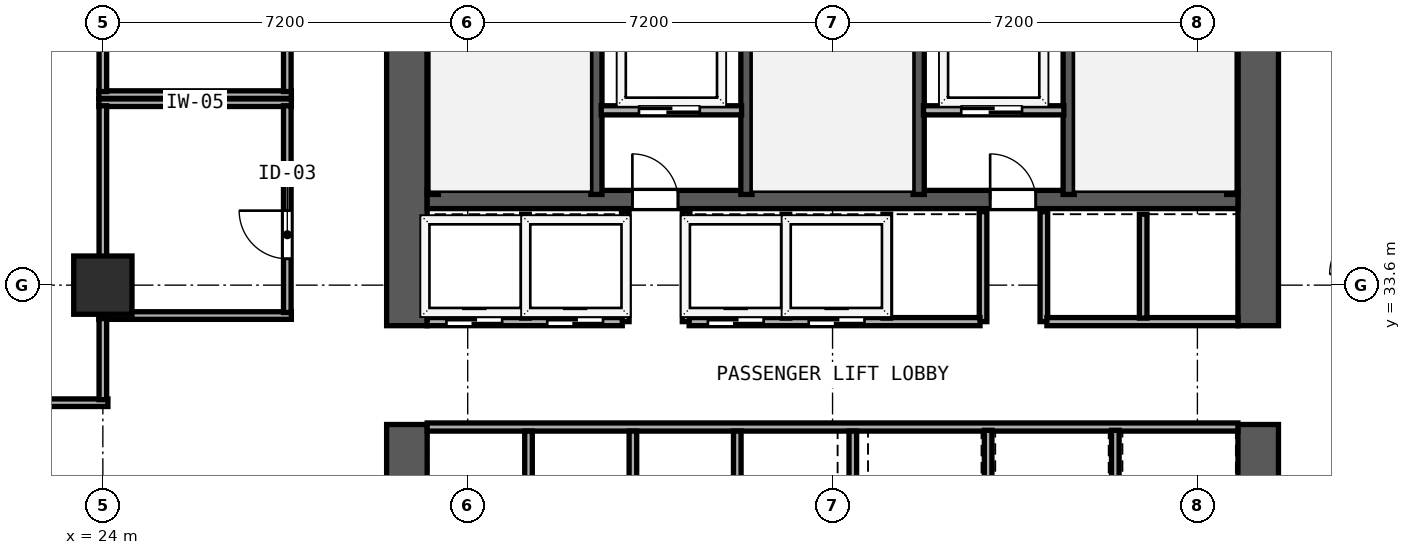
"""IFC4 building model, lengths in metres.
Left out: names, types, materials, properties, quantities, classifications, styles, units other than length and angle.
Written with IfcOpenShell. Run it as: python <this file> out.ifc"""

import sys

from ifc_helpers import new_model, si_unit, direction, frame, frame_2d, origin, origin_2d, place, context, subcontext, project, spatial, rectangle, hollow_rectangle, extrude, element, fill, save


model = new_model("IFC4")
c1 = context("Model", 3, precision=1e-05, world=origin(), true_north=direction((0.0, 1.0)))
c2 = subcontext(c1, "Body", "Model", "MODEL_VIEW")
j1 = project(units=[si_unit("LENGTHUNIT", "METRE"), si_unit("PLANEANGLEUNIT", "RADIAN")], contexts=[c1])
p1 = place(None, origin())
s1 = spatial("IfcSite", under=j1, at=p1, CompositionType="ELEMENT")
p2 = place(p1, origin())
s2 = spatial("IfcBuilding", under=s1, at=p2, CompositionType="ELEMENT")
p3 = place(p2, frame((0.0, 0.0, 55.2)))
s3 = spatial("IfcBuildingStorey", under=s2, at=p3, CompositionType="ELEMENT", Elevation=55.2)
p4 = place(p3, frame((30.0, 26.8, 0.0), z_axis=(0.0, 0.0, 1.0), x_axis=(0.0, 1.0, 0.0)))
e1 = element("IfcWall", 1, at=p4, inside=s3, PredefinedType="SHEAR", context=c2, shape_type="SweptSolid", body=[
    extrude(rectangle(XDim=4.05, YDim=0.8, at=frame_2d((2.025, 0.0))), origin(), (0.0, 0.0, 1.0), 3.6),
])
p5 = place(p3, frame((30.0, 32.8, 0.0), z_axis=(0.0, 0.0, 1.0), x_axis=(0.0, 1.0, 0.0)))
e2 = element("IfcWall", 2, at=p5, inside=s3, PredefinedType="SHEAR", context=c2, shape_type="SweptSolid", body=[
    extrude(rectangle(XDim=10.0, YDim=0.8, at=frame_2d((5.0, 0.0))), origin(), (0.0, 0.0, 1.0), 3.6),
])
p6 = place(p3, frame((46.8, 26.8, 0.0), z_axis=(0.0, 0.0, 1.0), x_axis=(0.0, 1.0, 0.0)))
e3 = element("IfcWall", 3, at=p6, inside=s3, PredefinedType="SHEAR", context=c2, shape_type="SweptSolid", body=[
    extrude(rectangle(XDim=4.05, YDim=0.8, at=frame_2d((2.025, 0.0))), origin(), (0.0, 0.0, 1.0), 3.6),
])
p7 = place(p3, frame((46.8, 32.8, 0.0), z_axis=(0.0, 0.0, 1.0), x_axis=(0.0, 1.0, 0.0)))
e4 = element("IfcWall", 4, at=p7, inside=s3, PredefinedType="SHEAR", context=c2, shape_type="SweptSolid", body=[
    extrude(rectangle(XDim=10.0, YDim=0.8, at=frame_2d((5.0, 0.0))), origin(), (0.0, 0.0, 1.0), 3.6),
])
p8 = place(p3, frame((30.4, 35.29, 0.0), z_axis=(0.0, 0.0, 1.0), x_axis=(1.0, 0.0, 0.0)))
e5 = element("IfcWall", 5, at=p8, inside=s3, PredefinedType="SHEAR", context=c2, shape_type="SweptSolid", body=[
    extrude(rectangle(XDim=16.0, YDim=0.36, at=frame_2d((8.0, 0.0))), origin(), (0.0, 0.0, 1.0), 3.6),
])
p9 = place(p8, frame((4.95, 0.0, 0.0), z_axis=(0.0, 0.0, 1.0), x_axis=(-1.0, 0.0, 0.0)))
e6 = element("IfcOpeningElement", 6, at=p9, cuts=e5, PredefinedType="OPENING", context=c2, shape_type="SweptSolid", body=[
    extrude(rectangle(XDim=0.9, YDim=2.1, at=frame_2d((0.45, 1.05))), frame((0.0, 0.19, 0.0), z_axis=(0.0, -1.0, 0.0), x_axis=(1.0, 0.0, 0.0)), (0.0, 0.0, 1.0), 0.38),
])
p10 = place(p8, frame((12.01, 0.0, 0.0), z_axis=(0.0, 0.0, 1.0), x_axis=(-1.0, 0.0, 0.0)))
e7 = element("IfcOpeningElement", 7, at=p10, cuts=e5, PredefinedType="OPENING", context=c2, shape_type="SweptSolid", body=[
    extrude(rectangle(XDim=0.9, YDim=2.1, at=frame_2d((0.45, 1.05))), frame((0.0, 0.19, 0.0), z_axis=(0.0, -1.0, 0.0), x_axis=(1.0, 0.0, 0.0)), (0.0, 0.0, 1.0), 0.38),
])
for number, where, z_axis, x_axis in (
    (8, (30.512, 35.39, 0.0), (0.0, 0.0, 1.0), (0.0, 1.0, 0.0)),
    (9, (33.74, 35.39, 0.0), (0.0, 0.0, 1.0), (0.0, 1.0, 0.0)),
    (10, (36.7, 35.39, 0.0), (0.0, 0.0, 1.0), (0.0, 1.0, 0.0)),
    (11, (40.1, 35.39, 0.0), (0.0, 0.0, 1.0), (0.0, 1.0, 0.0)),
    (12, (43.06, 35.39, 0.0), (0.0, 0.0, 1.0), (0.0, 1.0, 0.0)),
    (13, (46.288, 35.39, 0.0), (0.0, 0.0, 1.0), (0.0, 1.0, 0.0)),
):
    element("IfcWall", number, at=place(p3, frame(where, z_axis=z_axis, x_axis=x_axis)), inside=s3, PredefinedType="SHEAR", context=c2, shape_type="SweptSolid", body=[
        extrude(rectangle(XDim=7.41, YDim=0.22, at=frame_2d((3.705, 0.0))), origin(), (0.0, 0.0, 1.0), 3.6),
    ])
p11 = place(p3, frame((24.0, 33.6, 0.0), z_axis=(0.0, 0.0, 1.0), x_axis=(1.0, 0.0, 0.0)))
e14 = element("IfcColumn", 14, at=p11, inside=s3, PredefinedType="COLUMN", context=c2, shape_type="SweptSolid", body=[
    extrude(hollow_rectangle(XDim=1.15, YDim=1.15, WallThickness=0.042, at=origin_2d()), origin(), (0.0, 0.0, 1.0), 3.8),
])
p12 = place(p3, frame((33.835, 37.05, 0.0), z_axis=(0.0, 0.0, 1.0), x_axis=(1.0, 0.0, 0.0)))
e15 = element("IfcWall", 15, at=p12, inside=s3, PredefinedType="SOLIDWALL", context=c2, shape_type="SweptSolid", body=[
    extrude(rectangle(XDim=2.77, YDim=0.18, at=frame_2d((1.385, 0.0))), origin(), (0.0, 0.0, 1.0), 3.6),
])
p13 = place(p12, frame((1.945, 0.0, 0.0), z_axis=(0.0, 0.0, 1.0), x_axis=(-1.0, 0.0, 0.0)))
e16 = element("IfcOpeningElement", 16, at=p13, cuts=e15, PredefinedType="OPENING", context=c2, shape_type="SweptSolid", body=[
    extrude(rectangle(XDim=1.2, YDim=2.2, at=frame_2d((0.6, 1.1))), frame((0.0, 0.1, 0.0), z_axis=(0.0, -1.0, 0.0), x_axis=(1.0, 0.0, 0.0)), (0.0, 0.0, 1.0), 0.2),
])
for number, where, z_axis, x_axis in (
    (17, (34.31, 32.88, 0.0), (0.0, 0.0, 1.0), (0.0, 1.0, 0.0)),
    (18, (35.51, 32.88, 0.0), (0.0, 0.0, 1.0), (0.0, 1.0, 0.0)),
):
    element("IfcWall", number, at=place(p3, frame(where, z_axis=z_axis, x_axis=x_axis)), inside=s3, PredefinedType="SOLIDWALL", context=c2, shape_type="SweptSolid", body=[
        extrude(rectangle(XDim=2.17, YDim=0.15, at=frame_2d((1.085, 0.0))), origin(), (0.0, 0.0, 1.0), 3.6),
    ])
p14 = place(p3, frame((40.195, 37.05, 0.0), z_axis=(0.0, 0.0, 1.0), x_axis=(1.0, 0.0, 0.0)))
e19 = element("IfcWall", 19, at=p14, inside=s3, PredefinedType="SOLIDWALL", context=c2, shape_type="SweptSolid", body=[
    extrude(rectangle(XDim=2.77, YDim=0.18, at=frame_2d((1.385, 0.0))), origin(), (0.0, 0.0, 1.0), 3.6),
])
p15 = place(p14, frame((1.945, 0.0, 0.0), z_axis=(0.0, 0.0, 1.0), x_axis=(-1.0, 0.0, 0.0)))
e20 = element("IfcOpeningElement", 20, at=p15, cuts=e19, PredefinedType="OPENING", context=c2, shape_type="SweptSolid", body=[
    extrude(rectangle(XDim=1.2, YDim=2.2, at=frame_2d((0.6, 1.1))), frame((0.0, 0.1, 0.0), z_axis=(0.0, -1.0, 0.0), x_axis=(1.0, 0.0, 0.0)), (0.0, 0.0, 1.0), 0.2),
])
for number, where, z_axis, x_axis in (
    (21, (41.37, 32.88, 0.0), (0.0, 0.0, 1.0), (0.0, 1.0, 0.0)),
    (22, (42.57, 32.88, 0.0), (0.0, 0.0, 1.0), (0.0, 1.0, 0.0)),
):
    element("IfcWall", number, at=place(p3, frame(where, z_axis=z_axis, x_axis=x_axis)), inside=s3, PredefinedType="SOLIDWALL", context=c2, shape_type="SweptSolid", body=[
        extrude(rectangle(XDim=2.17, YDim=0.15, at=frame_2d((1.085, 0.0))), origin(), (0.0, 0.0, 1.0), 3.6),
    ])
p16 = place(p3, frame((30.4, 32.88, 0.0), z_axis=(0.0, 0.0, 1.0), x_axis=(1.0, 0.0, 0.0)))
e23 = element("IfcWall", 23, at=p16, inside=s3, PredefinedType="SOLIDWALL", context=c2, shape_type="SweptSolid", body=[
    extrude(rectangle(XDim=3.85, YDim=0.16, at=frame_2d((1.925, 0.0))), origin(), (0.0, 0.0, 1.0), 3.6),
])
p17 = place(p16, frame((1.48, 0.0, 0.0), z_axis=(0.0, 0.0, 1.0), x_axis=(-1.0, 0.0, 0.0)))
e24 = element("IfcOpeningElement", 24, at=p17, cuts=e23, PredefinedType="OPENING", context=c2, shape_type="SweptSolid", body=[
    extrude(rectangle(XDim=1.1, YDim=2.2, at=frame_2d((0.55, 1.1))), frame((0.0, 0.09, 0.0), z_axis=(0.0, -1.0, 0.0), x_axis=(1.0, 0.0, 0.0)), (0.0, 0.0, 1.0), 0.18),
])
p18 = place(p16, frame((3.47, 0.0, 0.0), z_axis=(0.0, 0.0, 1.0), x_axis=(-1.0, 0.0, 0.0)))
e25 = element("IfcOpeningElement", 25, at=p18, cuts=e23, PredefinedType="OPENING", context=c2, shape_type="SweptSolid", body=[
    extrude(rectangle(XDim=1.1, YDim=2.2, at=frame_2d((0.55, 1.1))), frame((0.0, 0.09, 0.0), z_axis=(0.0, -1.0, 0.0), x_axis=(1.0, 0.0, 0.0)), (0.0, 0.0, 1.0), 0.18),
])
p19 = place(p3, frame((35.57, 32.88, 0.0), z_axis=(0.0, 0.0, 1.0), x_axis=(1.0, 0.0, 0.0)))
e26 = element("IfcWall", 26, at=p19, inside=s3, PredefinedType="SOLIDWALL", context=c2, shape_type="SweptSolid", body=[
    extrude(rectangle(XDim=5.74, YDim=0.16, at=frame_2d((2.87, 0.0))), origin(), (0.0, 0.0, 1.0), 3.6),
])
p20 = place(p19, frame((1.47, 0.0, 0.0), z_axis=(0.0, 0.0, 1.0), x_axis=(-1.0, 0.0, 0.0)))
e27 = element("IfcOpeningElement", 27, at=p20, cuts=e26, PredefinedType="OPENING", context=c2, shape_type="SweptSolid", body=[
    extrude(rectangle(XDim=1.1, YDim=2.2, at=frame_2d((0.55, 1.1))), frame((0.0, 0.09, 0.0), z_axis=(0.0, -1.0, 0.0), x_axis=(1.0, 0.0, 0.0)), (0.0, 0.0, 1.0), 0.18),
])
p21 = place(p19, frame((3.46, 0.0, 0.0), z_axis=(0.0, 0.0, 1.0), x_axis=(-1.0, 0.0, 0.0)))
e28 = element("IfcOpeningElement", 28, at=p21, cuts=e26, PredefinedType="OPENING", context=c2, shape_type="SweptSolid", body=[
    extrude(rectangle(XDim=1.1, YDim=2.2, at=frame_2d((0.55, 1.1))), frame((0.0, 0.09, 0.0), z_axis=(0.0, -1.0, 0.0), x_axis=(1.0, 0.0, 0.0)), (0.0, 0.0, 1.0), 0.18),
])
p22 = place(p3, frame((42.63, 32.88, 0.0), z_axis=(0.0, 0.0, 1.0), x_axis=(1.0, 0.0, 0.0)))
e29 = element("IfcWall", 29, at=p22, inside=s3, PredefinedType="SOLIDWALL", context=c2, shape_type="SweptSolid", body=[
    extrude(rectangle(XDim=3.77, YDim=0.16, at=frame_2d((1.885, 0.0))), origin(), (0.0, 0.0, 1.0), 3.6),
])
for number, where, z_axis, x_axis in (
    (30, (32.34, 32.95, 0.0), (0.0, 0.0, 1.0), (0.0, 1.0, 0.0)),
    (31, (37.48, 32.95, 0.0), (0.0, 0.0, 1.0), (0.0, 1.0, 0.0)),
    (32, (39.47, 32.95, 0.0), (0.0, 0.0, 1.0), (0.0, 1.0, 0.0)),
    (33, (44.53, 32.95, 0.0), (0.0, 0.0, 1.0), (0.0, 1.0, 0.0)),
):
    element("IfcWall", number, at=place(p3, frame(where, z_axis=z_axis, x_axis=x_axis)), inside=s3, PredefinedType="SOLIDWALL", context=c2, shape_type="SweptSolid", body=[
        extrude(rectangle(XDim=2.05, YDim=0.15, at=frame_2d((1.025, 0.0))), origin(), (0.0, 0.0, 1.0), 3.6),
    ])
p23 = place(p3, frame((30.4, 30.8, 0.0), z_axis=(0.0, 0.0, 1.0), x_axis=(1.0, 0.0, 0.0)))
e34 = element("IfcWall", 34, at=p23, inside=s3, PredefinedType="SOLIDWALL", context=c2, shape_type="SweptSolid", body=[
    extrude(rectangle(XDim=16.0, YDim=0.16, at=frame_2d((8.0, 0.0))), origin(), (0.0, 0.0, 1.0), 3.6),
])
for number, where, z_axis, x_axis in (
    (35, (32.4, 28.735, 0.0), (0.0, 0.0, 1.0), (0.0, 1.0, 0.0)),
    (36, (34.46, 28.735, 0.0), (0.0, 0.0, 1.0), (0.0, 1.0, 0.0)),
    (37, (36.52, 28.735, 0.0), (0.0, 0.0, 1.0), (0.0, 1.0, 0.0)),
    (38, (38.8, 28.735, 0.0), (0.0, 0.0, 1.0), (0.0, 1.0, 0.0)),
):
    element("IfcWall", number, at=place(p3, frame(where, z_axis=z_axis, x_axis=x_axis)), inside=s3, PredefinedType="SOLIDWALL", context=c2, shape_type="SweptSolid", body=[
        extrude(rectangle(XDim=1.985, YDim=0.15, at=frame_2d((0.992, 0.0))), origin(), (0.0, 0.0, 1.0), 3.6),
    ])
for number, where, z_axis, x_axis in (
    (39, (41.47, 28.75, 0.0), (0.0, 0.0, 1.0), (0.0, 1.0, 0.0)),
    (40, (43.98, 28.75, 0.0), (0.0, 0.0, 1.0), (0.0, 1.0, 0.0)),
):
    element("IfcWall", number, at=place(p3, frame(where, z_axis=z_axis, x_axis=x_axis)), inside=s3, PredefinedType="SOLIDWALL", context=c2, shape_type="SweptSolid", body=[
        extrude(rectangle(XDim=1.985, YDim=0.15, at=frame_2d((0.993, 0.0))), origin(), (0.0, 0.0, 1.0), 3.6),
    ])
for number, where, z_axis, x_axis in (
    (41, (23.92, 37.2, 0.0), (0.0, 0.0, 1.0), (1.0, 0.0, 0.0)),
    (42, (23.92, 33.0, 0.0), (0.0, 0.0, 1.0), (1.0, 0.0, 0.0)),
):
    element("IfcWall", number, at=place(p3, frame(where, z_axis=z_axis, x_axis=x_axis)), inside=s3, PredefinedType="PARTITIONING", context=c2, shape_type="SweptSolid", body=[
        extrude(rectangle(XDim=3.8, YDim=0.15, at=frame_2d((1.9, 0.0))), origin(), (0.0, 0.0, 1.0), 3.6),
    ])
p24 = place(p3, frame((24.0, 33.06, 0.0), z_axis=(0.0, 0.0, 1.0), x_axis=(0.0, 1.0, 0.0)))
e43 = element("IfcWall", 43, at=p24, inside=s3, PredefinedType="PARTITIONING", context=c2, shape_type="SweptSolid", body=[
    extrude(rectangle(XDim=4.08, YDim=0.15, at=frame_2d((2.04, 0.0))), origin(), (0.0, 0.0, 1.0), 3.097),
])
p25 = place(p3, frame((27.64, 33.06, 0.0), z_axis=(0.0, 0.0, 1.0), x_axis=(0.0, 1.0, 0.0)))
e44 = element("IfcWall", 44, at=p25, inside=s3, PredefinedType="PARTITIONING", context=c2, shape_type="SweptSolid", body=[
    extrude(rectangle(XDim=4.08, YDim=0.15, at=frame_2d((2.04, 0.0))), origin(), (0.0, 0.0, 1.0), 3.6),
])
p26 = place(p25, frame((2.01, 0.0, 0.0), z_axis=(0.0, 0.0, 1.0), x_axis=(-1.0, 0.0, 0.0)))
e45 = element("IfcOpeningElement", 45, at=p26, cuts=e44, PredefinedType="OPENING", context=c2, shape_type="SweptSolid", body=[
    extrude(rectangle(XDim=0.95, YDim=2.12, at=frame_2d((0.475, 1.06))), frame((0.0, 0.085, 0.0), z_axis=(0.0, -1.0, 0.0), x_axis=(1.0, 0.0, 0.0)), (0.0, 0.0, 1.0), 0.17),
])
p27 = place(p3, frame((23.92, 37.36, 0.0), z_axis=(0.0, 0.0, 1.0), x_axis=(1.0, 0.0, 0.0)))
e46 = element("IfcWall", 46, at=p27, inside=s3, PredefinedType="PARTITIONING", context=c2, shape_type="SweptSolid", body=[
    extrude(rectangle(XDim=3.8, YDim=0.15, at=frame_2d((1.9, 0.0))), origin(), (0.0, 0.0, 1.0), 3.6),
])
p28 = place(p3, frame((24.0, 37.42, 0.0), z_axis=(0.0, 0.0, 1.0), x_axis=(0.0, 1.0, 0.0)))
e47 = element("IfcWall", 47, at=p28, inside=s3, PredefinedType="PARTITIONING", context=c2, shape_type="SweptSolid", body=[
    extrude(rectangle(XDim=6.743, YDim=0.15, at=frame_2d((3.372, 0.0))), origin(), (0.0, 0.0, 1.0), 3.097),
])
p29 = place(p3, frame((27.64, 37.42, 0.0), z_axis=(0.0, 0.0, 1.0), x_axis=(0.0, 1.0, 0.0)))
e48 = element("IfcWall", 48, at=p29, inside=s3, PredefinedType="PARTITIONING", context=c2, shape_type="SweptSolid", body=[
    extrude(rectangle(XDim=8.54, YDim=0.15, at=frame_2d((4.27, 0.0))), origin(), (0.0, 0.0, 1.0), 3.6),
])
p30 = place(p29, frame((3.61, 0.0, 0.0), z_axis=(0.0, 0.0, 1.0), x_axis=(-1.0, 0.0, 0.0)))
e49 = element("IfcOpeningElement", 49, at=p30, cuts=e48, PredefinedType="OPENING", context=c2, shape_type="SweptSolid", body=[
    extrude(rectangle(XDim=0.95, YDim=2.12, at=frame_2d((0.475, 1.06))), frame((0.0, 0.085, 0.0), z_axis=(0.0, -1.0, 0.0), x_axis=(1.0, 0.0, 0.0)), (0.0, 0.0, 1.0), 0.17),
])
p31 = place(p3, frame((16.542, 31.28, 0.0), z_axis=(0.0, 0.0, 1.0), x_axis=(1.0, 0.0, 0.0)))
e50 = element("IfcWall", 50, at=p31, inside=s3, PredefinedType="PARTITIONING", context=c2, shape_type="SweptSolid", body=[
    extrude(rectangle(XDim=7.558, YDim=0.15, at=frame_2d((3.779, 0.0))), origin(), (0.0, 0.0, 1.0), 3.6),
])
p32 = place(p31, frame((2.869, 0.0, 0.0)))
e51 = element("IfcOpeningElement", 51, at=p32, cuts=e50, PredefinedType="OPENING", context=c2, shape_type="SweptSolid", body=[
    extrude(rectangle(XDim=0.95, YDim=2.18, at=frame_2d((0.475, 1.09))), frame((0.0, 0.085, 0.0), z_axis=(0.0, -1.0, 0.0), x_axis=(1.0, 0.0, 0.0)), (0.0, 0.0, 1.0), 0.17),
])
p33 = place(p3, frame((24.0, 31.34, 0.0), z_axis=(0.0, 0.0, 1.0), x_axis=(0.0, 1.0, 0.0)))
e52 = element("IfcWall", 52, at=p33, inside=s3, PredefinedType="PARTITIONING", context=c2, shape_type="SweptSolid", body=[
    extrude(rectangle(XDim=1.6, YDim=0.15, at=frame_2d((0.8, 0.0))), origin(), (0.0, 0.0, 1.0), 3.097),
])
p34 = place(p13, origin())
e53 = element("IfcDoor", 53, at=p34, inside=s3, OperationType="SLIDING_TO_RIGHT", PredefinedType="DOOR", context=c2, shape_type="SweptSolid", body=[
    extrude(rectangle(XDim=1.2, YDim=2.2, at=frame_2d((0.6, 1.1))), frame((0.0, 0.025, 0.0), z_axis=(0.0, -1.0, 0.0), x_axis=(1.0, 0.0, 0.0)), (0.0, 0.0, 1.0), 0.05),
])
fill(e16, e53)
p35 = place(p9, origin())
e54 = element("IfcDoor", 54, at=p35, inside=s3, OperationType="SINGLE_SWING_RIGHT", PredefinedType="DOOR", context=c2, shape_type="SweptSolid", body=[
    extrude(rectangle(XDim=0.9, YDim=2.1, at=frame_2d((0.45, 1.05))), frame((0.0, 0.025, 0.0), z_axis=(0.0, -1.0, 0.0), x_axis=(1.0, 0.0, 0.0)), (0.0, 0.0, 1.0), 0.05),
])
fill(e6, e54)
p36 = place(p15, origin())
e55 = element("IfcDoor", 55, at=p36, inside=s3, OperationType="SLIDING_TO_RIGHT", PredefinedType="DOOR", context=c2, shape_type="SweptSolid", body=[
    extrude(rectangle(XDim=1.2, YDim=2.2, at=frame_2d((0.6, 1.1))), frame((0.0, 0.025, 0.0), z_axis=(0.0, -1.0, 0.0), x_axis=(1.0, 0.0, 0.0)), (0.0, 0.0, 1.0), 0.05),
])
fill(e20, e55)
p37 = place(p10, origin())
e56 = element("IfcDoor", 56, at=p37, inside=s3, OperationType="SINGLE_SWING_RIGHT", PredefinedType="DOOR", context=c2, shape_type="SweptSolid", body=[
    extrude(rectangle(XDim=0.9, YDim=2.1, at=frame_2d((0.45, 1.05))), frame((0.0, 0.025, 0.0), z_axis=(0.0, -1.0, 0.0), x_axis=(1.0, 0.0, 0.0)), (0.0, 0.0, 1.0), 0.05),
])
fill(e7, e56)
p38 = place(p17, origin())
e57 = element("IfcDoor", 57, at=p38, inside=s3, OperationType="SLIDING_TO_LEFT", PredefinedType="DOOR", context=c2, shape_type="SweptSolid", body=[
    extrude(rectangle(XDim=1.1, YDim=2.2, at=frame_2d((0.55, 1.1))), frame((0.0, 0.025, 0.0), z_axis=(0.0, -1.0, 0.0), x_axis=(1.0, 0.0, 0.0)), (0.0, 0.0, 1.0), 0.05),
])
fill(e24, e57)
p39 = place(p18, origin())
e58 = element("IfcDoor", 58, at=p39, inside=s3, OperationType="SLIDING_TO_LEFT", PredefinedType="DOOR", context=c2, shape_type="SweptSolid", body=[
    extrude(rectangle(XDim=1.1, YDim=2.2, at=frame_2d((0.55, 1.1))), frame((0.0, 0.025, 0.0), z_axis=(0.0, -1.0, 0.0), x_axis=(1.0, 0.0, 0.0)), (0.0, 0.0, 1.0), 0.05),
])
fill(e25, e58)
p40 = place(p20, origin())
e59 = element("IfcDoor", 59, at=p40, inside=s3, OperationType="SLIDING_TO_LEFT", PredefinedType="DOOR", context=c2, shape_type="SweptSolid", body=[
    extrude(rectangle(XDim=1.1, YDim=2.2, at=frame_2d((0.55, 1.1))), frame((0.0, 0.025, 0.0), z_axis=(0.0, -1.0, 0.0), x_axis=(1.0, 0.0, 0.0)), (0.0, 0.0, 1.0), 0.05),
])
fill(e27, e59)
p41 = place(p21, origin())
e60 = element("IfcDoor", 60, at=p41, inside=s3, OperationType="SLIDING_TO_LEFT", PredefinedType="DOOR", context=c2, shape_type="SweptSolid", body=[
    extrude(rectangle(XDim=1.1, YDim=2.2, at=frame_2d((0.55, 1.1))), frame((0.0, 0.025, 0.0), z_axis=(0.0, -1.0, 0.0), x_axis=(1.0, 0.0, 0.0)), (0.0, 0.0, 1.0), 0.05),
])
fill(e28, e60)
p42 = place(p26, origin())
e61 = element("IfcDoor", 61, at=p42, inside=s3, OperationType="SINGLE_SWING_LEFT", PredefinedType="DOOR", context=c2, shape_type="SweptSolid", body=[
    extrude(rectangle(XDim=0.95, YDim=2.12, at=frame_2d((0.475, 1.06))), frame((0.0, 0.025, 0.0), z_axis=(0.0, -1.0, 0.0), x_axis=(1.0, 0.0, 0.0)), (0.0, 0.0, 1.0), 0.05),
])
fill(e45, e61)
save(model, sys.argv[1])
